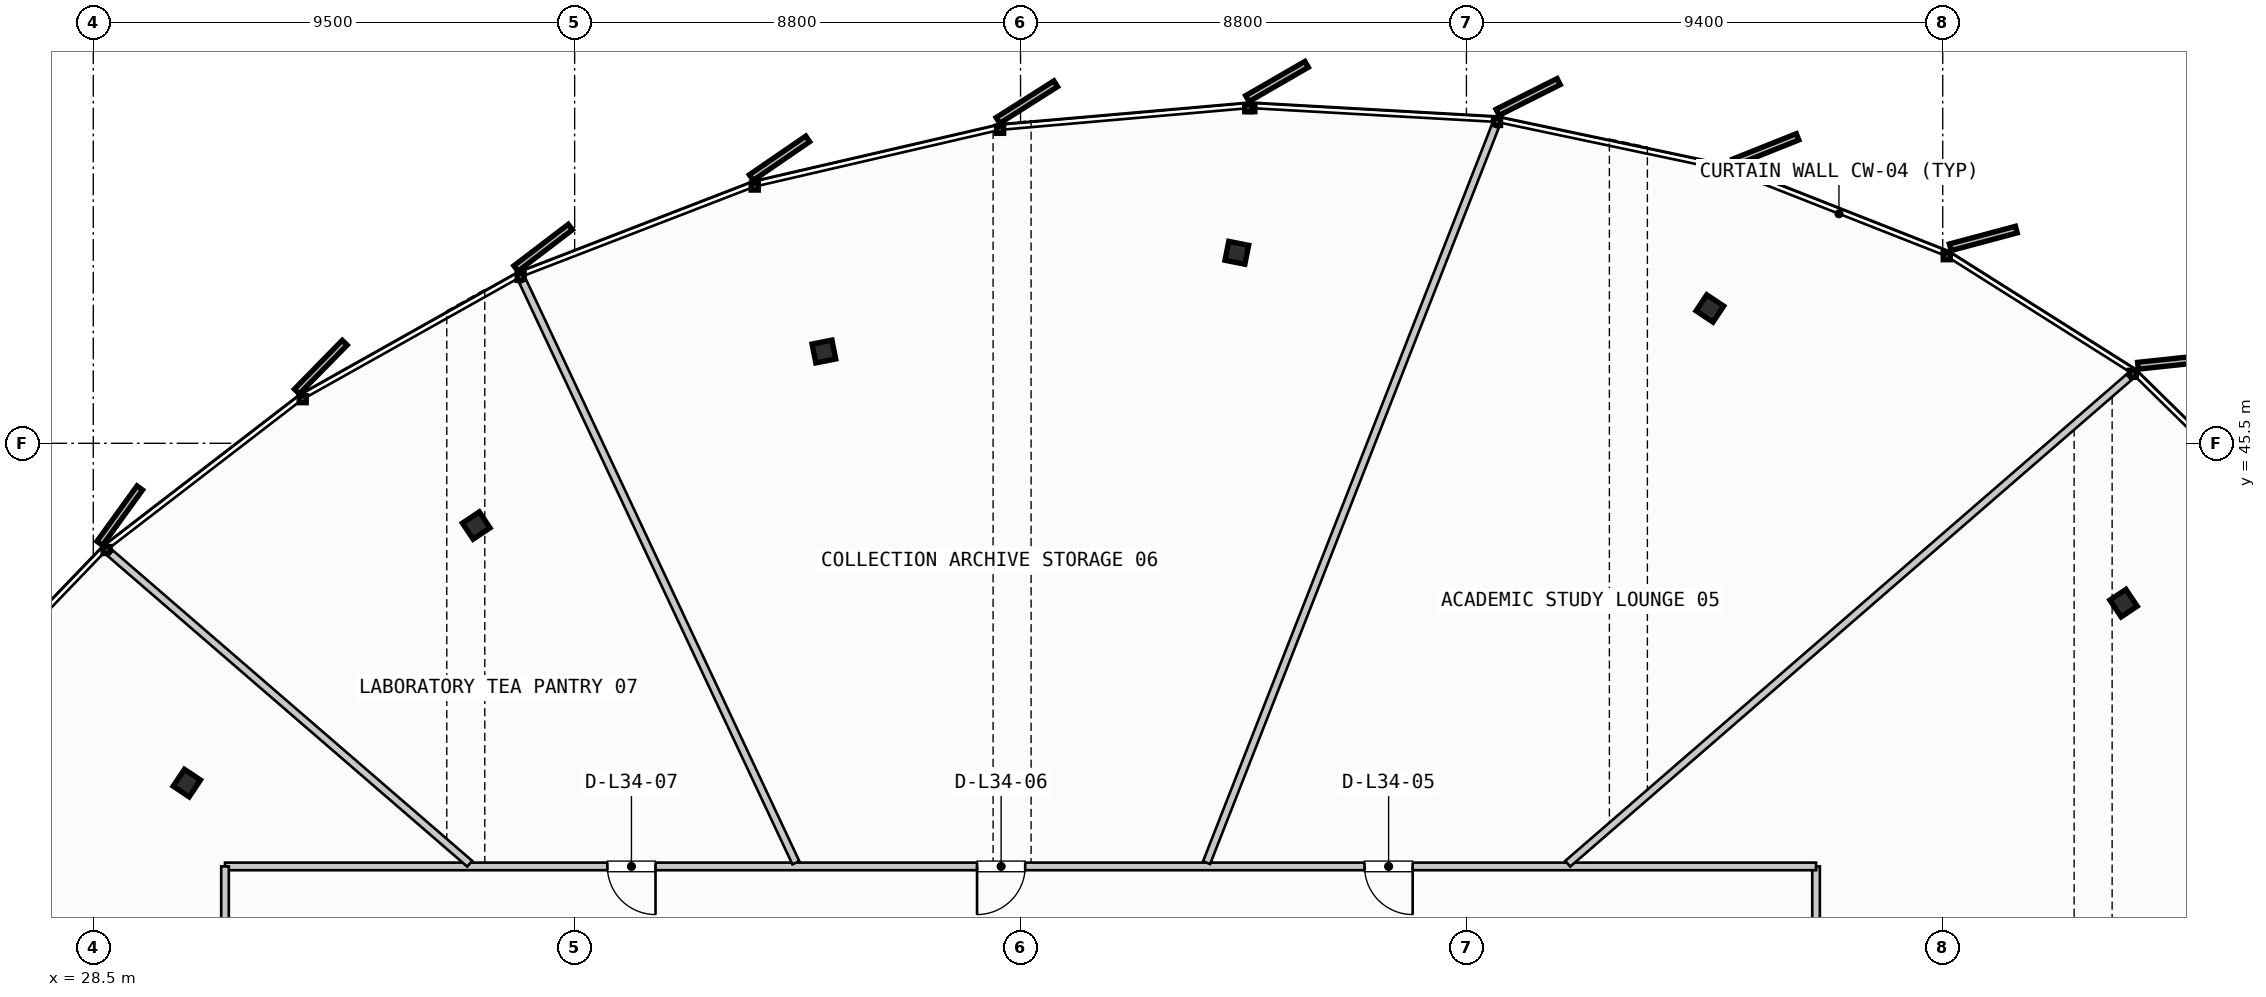
"""IFC4 building model, lengths in metres.
Left out: names, types, materials, properties, quantities, classifications, styles, units other than length and angle.
Written with IfcOpenShell. Run it as: python <this file> out.ifc"""

import sys

from ifc_helpers import new_model, si_unit, direction, frame, frame_2d, origin, origin_2d, place, context, subcontext, project, spatial, rectangle, i_section, extrude, source, transform, mapped, element, fill, save


model = new_model("IFC4")
c1 = context("Model", 3, precision=1e-05, world=origin(), true_north=direction((0.0, 1.0)))
c2 = subcontext(c1, "Body", "Model", "MODEL_VIEW")
j1 = project(units=[si_unit("LENGTHUNIT", "METRE"), si_unit("PLANEANGLEUNIT", "RADIAN")], contexts=[c1])
p1 = place(None, origin())
s1 = spatial("IfcSite", under=j1, at=p1, CompositionType="ELEMENT")
p2 = place(p1, origin())
s2 = spatial("IfcBuilding", under=s1, at=p2, CompositionType="ELEMENT")
p3 = place(p2, frame((0.0, 0.0, 135.9)))
s3 = spatial("IfcBuildingStorey", under=s2, at=p3, CompositionType="ELEMENT", Elevation=135.9)
m1 = source(origin(), c2, "Body", "SweptSolid", [
    extrude(i_section(OverallWidth=0.401, OverallDepth=0.381, WebThickness=0.032, FlangeThickness=0.051, FilletRadius=0.015, at=origin_2d()), origin(), (0.0, 0.0, 1.0), 3.3),
])
for number, where, z_axis, x_axis in (
    (1, (68.569, 42.345, 0.0), (0.0, 0.0, 1.0), (0.831, 0.556, 0.0)),
    (2, (60.405, 48.161, 0.0), (0.0, 0.0, 1.0), (0.556, 0.831, 0.0)),
    (3, (51.069, 49.259, 0.0), (0.0, 0.0, 1.0), (0.195, 0.981, 0.0)),
    (4, (42.919, 47.311, 0.0), (0.0, 0.0, 1.0), (-0.195, 0.981, 0.0)),
    (5, (36.058, 43.877, 0.0), (0.0, 0.0, 1.0), (-0.556, 0.831, 0.0)),
    (6, (30.346, 38.794, 0.0), (0.0, 0.0, 1.0), (-0.831, 0.556, 0.0)),
):
    element("IfcColumn", number, at=place(p3, frame(where, z_axis=z_axis, x_axis=x_axis)), inside=s3, PredefinedType="COLUMN", context=c2, shape_type="MappedRepresentation", body=[
        mapped(m1, transform((0.0, 0.0, 0.0), scale=1.0)),
    ])
p4 = place(p3, frame((62.5, 35.45, 0.0), z_axis=(0.0, 0.0, 1.0), x_axis=(0.0, 1.0, 0.0)))
e7 = element("IfcWall", 7, at=p4, inside=s3, PredefinedType="PARTITIONING", context=c2, shape_type="SweptSolid", body=[
    extrude(rectangle(XDim=1.7, YDim=0.15, at=frame_2d((0.85, 0.0))), origin(), (0.0, 0.0, 1.0), 2.445),
])
p5 = place(p3, frame((62.5, 37.15, 0.0), z_axis=(0.0, 0.0, 1.0), x_axis=(-1.0, 0.0, 0.0)))
e8 = element("IfcWall", 8, at=p5, inside=s3, PredefinedType="PARTITIONING", context=c2, shape_type="SweptSolid", body=[
    extrude(rectangle(XDim=31.4, YDim=0.15, at=frame_2d((15.7, 0.0))), origin(), (0.0, 0.0, 1.0), 2.445),
])
p6 = place(p5, frame((7.961, 0.0, 0.0)))
e9 = element("IfcOpeningElement", 9, at=p6, cuts=e8, PredefinedType="OPENING", context=c2, shape_type="SweptSolid", body=[
    extrude(rectangle(XDim=0.95, YDim=2.15, at=frame_2d((0.475, 1.075))), frame((0.0, 0.085, 0.0), z_axis=(0.0, -1.0, 0.0), x_axis=(1.0, 0.0, 0.0)), (0.0, 0.0, 1.0), 0.17),
])
p7 = place(p5, frame((15.608, 0.0, 0.0)))
e10 = element("IfcOpeningElement", 10, at=p7, cuts=e8, PredefinedType="OPENING", context=c2, shape_type="SweptSolid", body=[
    extrude(rectangle(XDim=0.95, YDim=2.15, at=frame_2d((0.475, 1.075))), frame((0.0, 0.085, 0.0), z_axis=(0.0, -1.0, 0.0), x_axis=(1.0, 0.0, 0.0)), (0.0, 0.0, 1.0), 0.17),
])
p8 = place(p5, frame((22.904, 0.0, 0.0)))
e11 = element("IfcOpeningElement", 11, at=p8, cuts=e8, PredefinedType="OPENING", context=c2, shape_type="SweptSolid", body=[
    extrude(rectangle(XDim=0.95, YDim=2.15, at=frame_2d((0.475, 1.075))), frame((0.0, 0.085, 0.0), z_axis=(0.0, -1.0, 0.0), x_axis=(1.0, 0.0, 0.0)), (0.0, 0.0, 1.0), 0.17),
])
p9 = place(p3, frame((31.1, 37.15, 0.0), z_axis=(0.0, 0.0, 1.0), x_axis=(0.0, -1.0, 0.0)))
e12 = element("IfcWall", 12, at=p9, inside=s3, PredefinedType="PARTITIONING", context=c2, shape_type="SweptSolid", body=[
    extrude(rectangle(XDim=1.7, YDim=0.15, at=frame_2d((0.85, 0.0))), origin(), (0.0, 0.0, 1.0), 2.445),
])
p10 = place(p3, frame((57.599, 37.202, 0.0), z_axis=(0.0, 0.0, 1.0), x_axis=(0.755590707882, 0.655044030705, 0.0)))
e13 = element("IfcWall", 13, at=p10, inside=s3, PredefinedType="PARTITIONING", context=c2, shape_type="SweptSolid", body=[
    extrude(rectangle(XDim=14.659, YDim=0.15, at=frame_2d((7.329, 0.0))), origin(), (0.0, 0.0, 1.0), 2.445),
])
p11 = place(p3, frame((50.472, 37.225, 0.0), z_axis=(0.0, 0.0, 1.0), x_axis=(0.365046571016, 0.930989259331, 0.0)))
e14 = element("IfcWall", 14, at=p11, inside=s3, PredefinedType="PARTITIONING", context=c2, shape_type="SweptSolid", body=[
    extrude(rectangle(XDim=15.6, YDim=0.15, at=frame_2d((7.8, 0.0))), origin(), (0.0, 0.0, 1.0), 2.445),
])
p12 = place(p3, frame((42.366, 37.222, 0.0), z_axis=(0.0, 0.0, 1.0), x_axis=(-0.425227335241, 0.905086577828, 0.0)))
e15 = element("IfcWall", 15, at=p12, inside=s3, PredefinedType="PARTITIONING", context=c2, shape_type="SweptSolid", body=[
    extrude(rectangle(XDim=12.674, YDim=0.15, at=frame_2d((6.337, 0.0))), origin(), (0.0, 0.0, 1.0), 2.445),
])
p13 = place(p3, frame((35.93, 37.202, 0.0), z_axis=(0.0, 0.0, 1.0), x_axis=(-0.756714614839, 0.653745356916, 0.0)))
e16 = element("IfcWall", 16, at=p13, inside=s3, PredefinedType="PARTITIONING", context=c2, shape_type="SweptSolid", body=[
    extrude(rectangle(XDim=9.37, YDim=0.15, at=frame_2d((4.685, 0.0))), origin(), (0.0, 0.0, 1.0), 2.445),
])
m2 = source(origin(), c2, "Body", "SweptSolid", [
    extrude(rectangle(XDim=0.95, YDim=2.15, at=frame_2d((0.475, 1.075))), frame((0.0, 0.025, 0.0), z_axis=(0.0, -1.0, 0.0), x_axis=(1.0, 0.0, 0.0)), (0.0, 0.0, 1.0), 0.05),
])
p14 = place(p6, origin())
e17 = element("IfcDoor", 17, at=p14, inside=s3, OperationType="SINGLE_SWING_LEFT", PredefinedType="DOOR", context=c2, shape_type="MappedRepresentation", body=[
    mapped(m2, transform((0.0, 0.0, 0.0), scale=1.0)),
])
fill(e9, e17)
p15 = place(p7, origin())
e18 = element("IfcDoor", 18, at=p15, inside=s3, OperationType="SINGLE_SWING_RIGHT", PredefinedType="DOOR", context=c2, shape_type="MappedRepresentation", body=[
    mapped(m2, transform((0.0, 0.0, 0.0), scale=1.0)),
])
fill(e10, e18)
p16 = place(p8, origin())
e19 = element("IfcDoor", 19, at=p16, inside=s3, OperationType="SINGLE_SWING_LEFT", PredefinedType="DOOR", context=c2, shape_type="MappedRepresentation", body=[
    mapped(m2, transform((0.0, 0.0, 0.0), scale=1.0)),
])
fill(e11, e19)
save(model, sys.argv[1])
